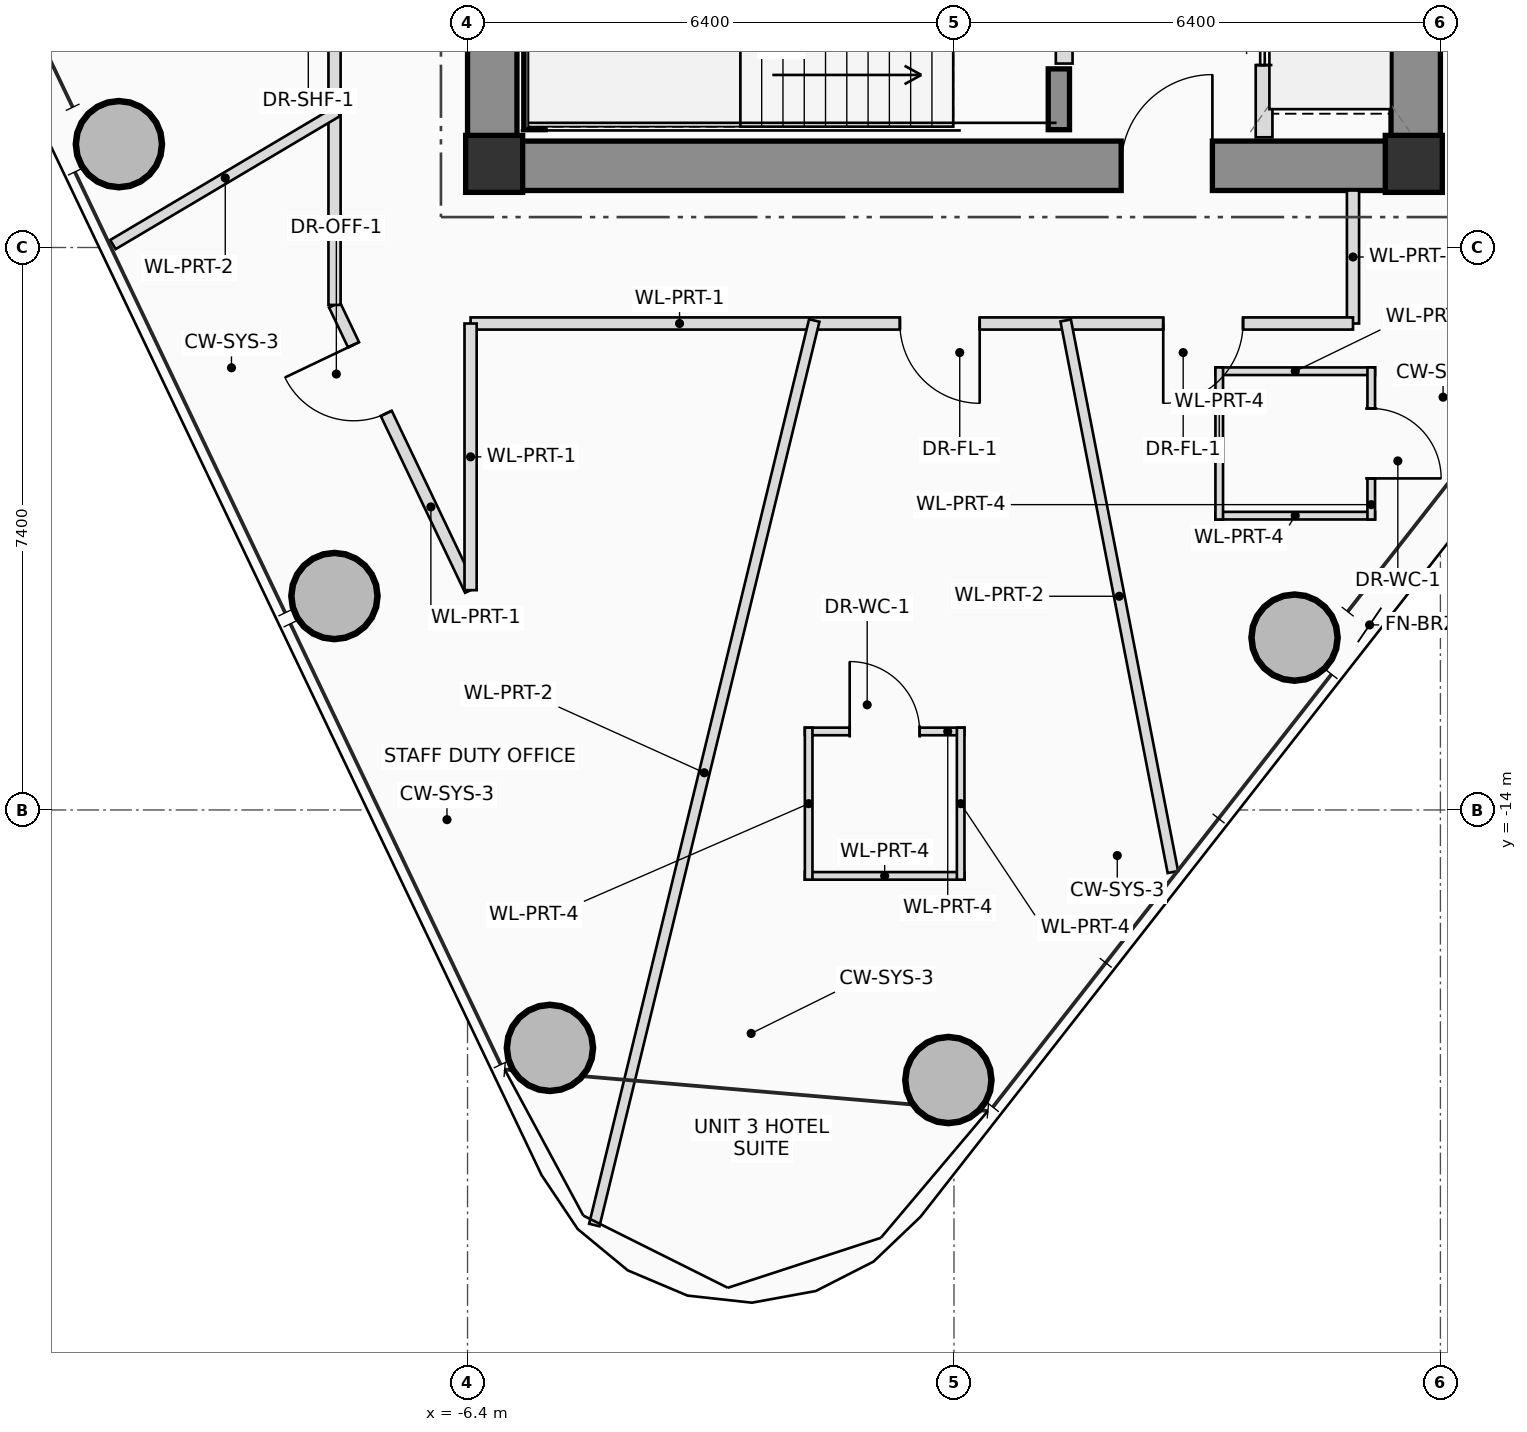
"""IFC4 building model, lengths in metres.
Left out: names, types, materials, properties, quantities, classifications, styles, units other than length and angle.
Written with IfcOpenShell. Run it as: python <this file> out.ifc"""

import sys

from ifc_helpers import new_model, si_unit, direction, frame, frame_2d, origin, origin_2d, place, context, subcontext, project, spatial, rectangle, hollow_circle, extrude, source, transform, mapped, element, fill, save


model = new_model("IFC4")
c1 = context("Model", 3, precision=1e-05, world=origin(), true_north=direction((0.0, 1.0)))
c2 = subcontext(c1, "Body", "Model", "MODEL_VIEW")
j1 = project(units=[si_unit("LENGTHUNIT", "METRE"), si_unit("PLANEANGLEUNIT", "RADIAN")], contexts=[c1])
p1 = place(None, origin())
s1 = spatial("IfcSite", under=j1, at=p1, CompositionType="ELEMENT")
p2 = place(p1, origin())
s2 = spatial("IfcBuilding", under=s1, at=p2, CompositionType="ELEMENT")
p3 = place(p2, frame((0.0, 0.0, 215.6)))
s3 = spatial("IfcBuildingStorey", under=s2, at=p3, CompositionType="ELEMENT", Elevation=215.6)
m1 = source(origin(), c2, "Body", "SweptSolid", [
    extrude(rectangle(XDim=0.75, YDim=0.75, at=origin_2d()), origin(), (0.0, 0.0, 1.0), 3.45),
])
for number, where, z_axis, x_axis in (
    (1, (-6.05, -5.5, 0.0), (0.0, 0.0, 1.0), (1.0, 0.0, 0.0)),
    (2, (6.05, -5.5, 0.0), (0.0, 0.0, 1.0), (1.0, 0.0, 0.0)),
):
    element("IfcColumn", number, at=place(p3, frame(where, z_axis=z_axis, x_axis=x_axis)), inside=s3, PredefinedType="COLUMN", context=c2, shape_type="MappedRepresentation", body=[
        mapped(m1, transform((0.0, 0.0, 0.0), scale=1.0)),
    ])
p4 = place(p3, frame((-6.4, -5.525, 0.0), z_axis=(0.0, 0.0, 1.0), x_axis=(1.0, 0.0, 0.0)))
e3 = element("IfcWall", 3, at=p4, inside=s3, PredefinedType="SHEAR", context=c2, shape_type="SweptSolid", body=[
    extrude(rectangle(XDim=12.8, YDim=0.65, at=frame_2d((6.4, 0.0))), origin(), (0.0, 0.0, 1.0), 3.45),
])
p5 = place(p4, frame((8.6, 0.0, 0.0)))
e4 = element("IfcOpeningElement", 4, at=p5, cuts=e3, PredefinedType="OPENING", context=c2, shape_type="SweptSolid", body=[
    extrude(rectangle(XDim=1.2, YDim=2.2, at=frame_2d((0.6, 1.1))), frame((0.0, 0.335, 0.0), z_axis=(0.0, -1.0, 0.0), x_axis=(1.0, 0.0, 0.0)), (0.0, 0.0, 1.0), 0.67),
])
p6 = place(p3, frame((6.075, -5.2, 0.0), z_axis=(0.0, 0.0, 1.0), x_axis=(0.0, 1.0, 0.0)))
e5 = element("IfcWall", 5, at=p6, inside=s3, PredefinedType="SHEAR", context=c2, shape_type="SweptSolid", body=[
    extrude(rectangle(XDim=10.4, YDim=0.65, at=frame_2d((5.2, 0.0))), origin(), (0.0, 0.0, 1.0), 3.45),
])
p7 = place(p3, frame((-6.075, -5.2, 0.0), z_axis=(0.0, 0.0, 1.0), x_axis=(0.0, 1.0, 0.0)))
e6 = element("IfcWall", 6, at=p7, inside=s3, PredefinedType="SHEAR", context=c2, shape_type="SweptSolid", body=[
    extrude(rectangle(XDim=3.45, YDim=0.65, at=frame_2d((1.725, 0.0))), origin(), (0.0, 0.0, 1.0), 3.45),
])
p8 = place(p3, frame((-5.52, -5.05, 0.0), z_axis=(0.0, 0.0, 1.0), x_axis=(0.0, 1.0, 0.0)))
e7 = element("IfcWall", 7, at=p8, inside=s3, PredefinedType="SHEAR", context=c2, shape_type="SweptSolid", body=[
    extrude(rectangle(XDim=2.75, YDim=0.28, at=frame_2d((1.375, 0.0))), origin(), (0.0, 0.0, 1.0), 3.45),
])
p9 = place(p3, frame((1.38, -5.05, 0.0), z_axis=(0.0, 0.0, 1.0), x_axis=(0.0, 1.0, 0.0)))
e8 = element("IfcWall", 8, at=p9, inside=s3, PredefinedType="SHEAR", context=c2, shape_type="SweptSolid", body=[
    extrude(rectangle(XDim=0.8, YDim=0.28, at=frame_2d((0.4, 0.0))), origin(), (0.0, 0.0, 1.0), 3.45),
])
m2 = source(origin(), c2, "Body", "SweptSolid", [
    extrude(hollow_circle(Radius=0.575, WallThickness=0.042, at=origin_2d()), origin(), (0.0, 0.0, 1.0), 3.45),
])
for number, where, z_axis, x_axis in (
    (9, (-0.073, -17.553, 0.0), (0.0, 0.0, 1.0), (1.0, 0.0, 0.0)),
    (10, (4.481, -11.732, 0.0), (0.0, 0.0, 1.0), (1.0, 0.0, 0.0)),
    (11, (-10.987, -5.24, 0.0), (0.0, 0.0, 1.0), (1.0, 0.0, 0.0)),
    (12, (-8.151, -11.185, 0.0), (0.0, 0.0, 1.0), (1.0, 0.0, 0.0)),
    (13, (-5.316, -17.13, 0.0), (0.0, 0.0, 1.0), (1.0, 0.0, 0.0)),
):
    element("IfcColumn", number, at=place(p3, frame(where, z_axis=z_axis, x_axis=x_axis)), inside=s3, PredefinedType="COLUMN", context=c2, shape_type="MappedRepresentation", body=[
        mapped(m2, transform((0.0, 0.0, 0.0), scale=1.0)),
    ])
p10 = place(p3, frame((1.45, -4.18, 0.0), z_axis=(0.0, 0.0, 1.0), x_axis=(0.0, 1.0, 0.0)))
e14 = element("IfcWall", 14, at=p10, inside=s3, PredefinedType="PLUMBINGWALL", context=c2, shape_type="SweptSolid", body=[
    extrude(rectangle(XDim=1.98, YDim=0.22, at=frame_2d((0.99, 0.0))), origin(), (0.0, 0.0, 1.0), 3.21),
])
p11 = place(p10, frame((0.42, 0.0, 0.0)))
e15 = element("IfcOpeningElement", 15, at=p11, cuts=e14, PredefinedType="OPENING", context=c2, shape_type="SweptSolid", body=[
    extrude(rectangle(XDim=1.15, YDim=2.15, at=frame_2d((0.575, 1.075))), frame((0.0, 0.12, 0.0), z_axis=(0.0, -1.0, 0.0), x_axis=(1.0, 0.0, 0.0)), (0.0, 0.0, 1.0), 0.24),
])
p12 = place(p3, frame((4.08, -5.15, 0.0), z_axis=(0.0, 0.0, 1.0), x_axis=(0.0, 1.0, 0.0)))
e16 = element("IfcWall", 16, at=p12, inside=s3, PredefinedType="PLUMBINGWALL", context=c2, shape_type="SweptSolid", body=[
    extrude(rectangle(XDim=2.95, YDim=0.22, at=frame_2d((1.475, 0.0))), origin(), (0.0, 0.0, 1.0), 3.21),
])
p13 = place(p12, frame((0.95, 0.0, 0.0)))
e17 = element("IfcOpeningElement", 17, at=p13, cuts=e16, PredefinedType="OPENING", context=c2, shape_type="SweptSolid", body=[
    extrude(rectangle(XDim=1.2, YDim=2.25, at=frame_2d((0.6, 1.125))), frame((0.0, 0.12, 0.0), z_axis=(0.0, -1.0, 0.0), x_axis=(1.0, 0.0, 0.0)), (0.0, 0.0, 1.0), 0.24),
])
p14 = place(p3, frame((-1.962, -12.967, 0.0), z_axis=(0.0, 0.0, 1.0), x_axis=(1.0, 0.0, 0.0)))
e18 = element("IfcWall", 18, at=p14, inside=s3, PredefinedType="PARTITIONING", context=c2, shape_type="SweptSolid", body=[
    extrude(rectangle(XDim=2.1, YDim=0.1, at=frame_2d((1.05, 0.0))), origin(), (0.0, 0.0, 1.0), 3.21),
])
p15 = place(p14, frame((0.59, 0.0, 0.0)))
e19 = element("IfcOpeningElement", 19, at=p15, cuts=e18, PredefinedType="OPENING", context=c2, shape_type="SweptSolid", body=[
    extrude(rectangle(XDim=0.92, YDim=2.1, at=frame_2d((0.46, 1.05))), frame((0.0, 0.06, 0.0), z_axis=(0.0, -1.0, 0.0), x_axis=(1.0, 0.0, 0.0)), (0.0, 0.0, 1.0), 0.12),
])
p16 = place(p3, frame((0.138, -14.867, 0.0), z_axis=(0.0, 0.0, 1.0), x_axis=(-1.0, 0.0, 0.0)))
e20 = element("IfcWall", 20, at=p16, inside=s3, PredefinedType="PARTITIONING", context=c2, shape_type="SweptSolid", body=[
    extrude(rectangle(XDim=2.1, YDim=0.1, at=frame_2d((1.05, 0.0))), origin(), (0.0, 0.0, 1.0), 2.565),
])
p17 = place(p3, frame((0.088, -12.917, 0.0), z_axis=(0.0, 0.0, 1.0), x_axis=(0.0, -1.0, 0.0)))
e21 = element("IfcWall", 21, at=p17, inside=s3, PredefinedType="PARTITIONING", context=c2, shape_type="SweptSolid", body=[
    extrude(rectangle(XDim=2.0, YDim=0.1, at=frame_2d((1.0, 0.0))), origin(), (0.0, 0.0, 1.0), 2.865),
])
p18 = place(p3, frame((-1.912, -14.917, 0.0), z_axis=(0.0, 0.0, 1.0), x_axis=(0.0, 1.0, 0.0)))
e22 = element("IfcWall", 22, at=p18, inside=s3, PredefinedType="PARTITIONING", context=c2, shape_type="SweptSolid", body=[
    extrude(rectangle(XDim=2.0, YDim=0.1, at=frame_2d((1.0, 0.0))), origin(), (0.0, 0.0, 1.0), 2.565),
])
for number, where, z_axis, x_axis in (
    (23, (3.44, -8.228, 0.0), (0.0, 0.0, 1.0), (1.0, 0.0, 0.0)),
    (24, (5.54, -10.128, 0.0), (0.0, 0.0, 1.0), (-1.0, 0.0, 0.0)),
):
    element("IfcWall", number, at=place(p3, frame(where, z_axis=z_axis, x_axis=x_axis)), inside=s3, PredefinedType="PARTITIONING", context=c2, shape_type="SweptSolid", body=[
        extrude(rectangle(XDim=2.1, YDim=0.1, at=frame_2d((1.05, 0.0))), origin(), (0.0, 0.0, 1.0), 2.565),
    ])
p19 = place(p3, frame((5.49, -8.178, 0.0), z_axis=(0.0, 0.0, 1.0), x_axis=(0.0, -1.0, 0.0)))
e25 = element("IfcWall", 25, at=p19, inside=s3, PredefinedType="PARTITIONING", context=c2, shape_type="SweptSolid", body=[
    extrude(rectangle(XDim=2.0, YDim=0.1, at=frame_2d((1.0, 0.0))), origin(), (0.0, 0.0, 1.0), 2.565),
])
p20 = place(p19, frame((0.54, 0.0, 0.0)))
e26 = element("IfcOpeningElement", 26, at=p20, cuts=e25, PredefinedType="OPENING", context=c2, shape_type="SweptSolid", body=[
    extrude(rectangle(XDim=0.92, YDim=2.1, at=frame_2d((0.46, 1.05))), frame((0.0, 0.06, 0.0), z_axis=(0.0, -1.0, 0.0), x_axis=(1.0, 0.0, 0.0)), (0.0, 0.0, 1.0), 0.12),
])
p21 = place(p3, frame((3.49, -10.178, 0.0), z_axis=(0.0, 0.0, 1.0), x_axis=(0.0, 1.0, 0.0)))
e27 = element("IfcWall", 27, at=p21, inside=s3, PredefinedType="PARTITIONING", context=c2, shape_type="SweptSolid", body=[
    extrude(rectangle(XDim=2.0, YDim=0.1, at=frame_2d((1.0, 0.0))), origin(), (0.0, 0.0, 1.0), 2.765),
])
p22 = place(p3, frame((-6.36, -11.108, 0.0), z_axis=(0.0, 0.0, 1.0), x_axis=(-0.430460013629, 0.902609648002, 0.0)))
e28 = element("IfcWall", 28, at=p22, inside=s3, PredefinedType="PARTITIONING", context=c2, shape_type="SweptSolid", body=[
    extrude(rectangle(XDim=4.158, YDim=0.16, at=frame_2d((2.079, 0.0))), origin(), (0.0, 0.0, 1.0), 2.565),
])
p23 = place(p22, frame((2.577, 0.0, 0.0)))
e29 = element("IfcOpeningElement", 29, at=p23, cuts=e28, PredefinedType="OPENING", context=c2, shape_type="SweptSolid", body=[
    extrude(rectangle(XDim=1.0, YDim=2.25, at=frame_2d((0.5, 1.125))), frame((0.0, 0.09, 0.0), z_axis=(0.0, -1.0, 0.0), x_axis=(1.0, 0.0, 0.0)), (0.0, 0.0, 1.0), 0.18),
])
p24 = place(p3, frame((-8.15, -7.355, 0.0), z_axis=(0.0, 0.0, 1.0), x_axis=(0.0, 1.0, 0.0)))
e30 = element("IfcWall", 30, at=p24, inside=s3, PredefinedType="PARTITIONING", context=c2, shape_type="SweptSolid", body=[
    extrude(rectangle(XDim=14.956, YDim=0.16, at=frame_2d((7.478, 0.0))), origin(), (0.0, 0.0, 1.0), 2.565),
])
p25 = place(p24, frame((4.034, 0.0, 0.0)))
e31 = element("IfcOpeningElement", 31, at=p25, cuts=e30, PredefinedType="OPENING", context=c2, shape_type="SweptSolid", body=[
    extrude(rectangle(XDim=0.9, YDim=2.05, at=frame_2d((0.45, 1.025))), frame((0.0, 0.09, 0.0), z_axis=(0.0, -1.0, 0.0), x_axis=(1.0, 0.0, 0.0)), (0.0, 0.0, 1.0), 0.18),
])
p26 = place(p24, frame((10.129, 0.0, 0.0)))
e32 = element("IfcOpeningElement", 32, at=p26, cuts=e30, PredefinedType="OPENING", context=c2, shape_type="SweptSolid", body=[
    extrude(rectangle(XDim=1.0, YDim=2.25, at=frame_2d((0.5, 1.125))), frame((0.0, 0.09, 0.0), z_axis=(0.0, -1.0, 0.0), x_axis=(1.0, 0.0, 0.0)), (0.0, 0.0, 1.0), 0.18),
])
p27 = place(p3, frame((5.25, -5.85, 0.0), z_axis=(0.0, 0.0, 1.0), x_axis=(0.0, -1.0, 0.0)))
e33 = element("IfcWall", 33, at=p27, inside=s3, PredefinedType="PARTITIONING", context=c2, shape_type="SweptSolid", body=[
    extrude(rectangle(XDim=1.75, YDim=0.16, at=frame_2d((0.875, 0.0))), origin(), (0.0, 0.0, 1.0), 3.21),
])
p28 = place(p3, frame((5.25, -7.6, 0.0), z_axis=(0.0, 0.0, 1.0), x_axis=(-1.0, 0.0, 0.0)))
e34 = element("IfcWall", 34, at=p28, inside=s3, PredefinedType="PARTITIONING", context=c2, shape_type="SweptSolid", body=[
    extrude(rectangle(XDim=11.61, YDim=0.16, at=frame_2d((5.805, 0.0))), origin(), (0.0, 0.0, 1.0), 2.565),
])
p29 = place(p28, frame((1.447, 0.0, 0.0)))
e35 = element("IfcOpeningElement", 35, at=p29, cuts=e34, PredefinedType="OPENING", context=c2, shape_type="SweptSolid", body=[
    extrude(rectangle(XDim=1.05, YDim=2.2, at=frame_2d((0.525, 1.1))), frame((0.0, 0.09, 0.0), z_axis=(0.0, -1.0, 0.0), x_axis=(1.0, 0.0, 0.0)), (0.0, 0.0, 1.0), 0.18),
])
p30 = place(p28, frame((4.912, 0.0, 0.0)))
e36 = element("IfcOpeningElement", 36, at=p30, cuts=e34, PredefinedType="OPENING", context=c2, shape_type="SweptSolid", body=[
    extrude(rectangle(XDim=1.05, YDim=2.2, at=frame_2d((0.525, 1.1))), frame((0.0, 0.09, 0.0), z_axis=(0.0, -1.0, 0.0), x_axis=(1.0, 0.0, 0.0)), (0.0, 0.0, 1.0), 0.18),
])
p31 = place(p3, frame((-6.36, -7.6, 0.0), z_axis=(0.0, 0.0, 1.0), x_axis=(0.0, -1.0, 0.0)))
e37 = element("IfcWall", 37, at=p31, inside=s3, PredefinedType="PARTITIONING", context=c2, shape_type="SweptSolid", body=[
    extrude(rectangle(XDim=3.508, YDim=0.16, at=frame_2d((1.754, 0.0))), origin(), (0.0, 0.0, 1.0), 3.21),
])
p32 = place(p3, frame((-8.11, -4.809, 0.0), z_axis=(0.0, 0.0, 1.0), x_axis=(-0.860151862046, -0.510038012524, 0.0)))
e38 = element("IfcWall", 38, at=p32, inside=s3, PredefinedType="PARTITIONING", context=c2, shape_type="SweptSolid", body=[
    extrude(rectangle(XDim=3.436, YDim=0.14, at=frame_2d((1.718, 0.0))), origin(), (0.0, 0.0, 1.0), 2.565),
])
p33 = place(p3, frame((-1.838, -7.56, 0.0), z_axis=(0.0, 0.0, 1.0), x_axis=(-0.236259509823, -0.971689993783, 0.0)))
e39 = element("IfcWall", 39, at=p33, inside=s3, PredefinedType="PARTITIONING", context=c2, shape_type="SweptSolid", body=[
    extrude(rectangle(XDim=12.247, YDim=0.14, at=frame_2d((6.124, 0.0))), origin(), (0.0, 0.0, 1.0), 2.565),
])
p34 = place(p3, frame((1.469, -7.56, 0.0), z_axis=(0.0, 0.0, 1.0), x_axis=(0.190822808967, -0.981624498257, 0.0)))
e40 = element("IfcWall", 40, at=p34, inside=s3, PredefinedType="PARTITIONING", context=c2, shape_type="SweptSolid", body=[
    extrude(rectangle(XDim=7.392, YDim=0.14, at=frame_2d((3.696, 0.0))), origin(), (0.0, 0.0, 1.0), 2.725),
])
p35 = place(p5, origin())
e41 = element("IfcDoor", 41, at=p35, inside=s3, OperationType="SINGLE_SWING_RIGHT", PredefinedType="DOOR", context=c2, shape_type="SweptSolid", body=[
    extrude(rectangle(XDim=1.2, YDim=2.2, at=frame_2d((0.6, 1.1))), frame((0.0, 0.025, 0.0), z_axis=(0.0, -1.0, 0.0), x_axis=(1.0, 0.0, 0.0)), (0.0, 0.0, 1.0), 0.05),
])
fill(e4, e41)
p36 = place(p13, origin())
e42 = element("IfcDoor", 42, at=p36, inside=s3, OperationType="DOUBLE_DOOR_SLIDING", PredefinedType="DOOR", context=c2, shape_type="SweptSolid", body=[
    extrude(rectangle(XDim=1.2, YDim=2.25, at=frame_2d((0.6, 1.125))), frame((0.0, 0.025, 0.0), z_axis=(0.0, -1.0, 0.0), x_axis=(1.0, 0.0, 0.0)), (0.0, 0.0, 1.0), 0.05),
])
fill(e17, e42)
p37 = place(p15, origin())
e43 = element("IfcDoor", 43, at=p37, inside=s3, OperationType="SINGLE_SWING_LEFT", PredefinedType="DOOR", context=c2, shape_type="SweptSolid", body=[
    extrude(rectangle(XDim=0.92, YDim=2.1, at=frame_2d((0.46, 1.05))), frame((0.0, 0.025, 0.0), z_axis=(0.0, -1.0, 0.0), x_axis=(1.0, 0.0, 0.0)), (0.0, 0.0, 1.0), 0.05),
])
fill(e19, e43)
p38 = place(p20, origin())
e44 = element("IfcDoor", 44, at=p38, inside=s3, OperationType="SINGLE_SWING_RIGHT", PredefinedType="DOOR", context=c2, shape_type="SweptSolid", body=[
    extrude(rectangle(XDim=0.92, YDim=2.1, at=frame_2d((0.46, 1.05))), frame((0.0, 0.025, 0.0), z_axis=(0.0, -1.0, 0.0), x_axis=(1.0, 0.0, 0.0)), (0.0, 0.0, 1.0), 0.05),
])
fill(e26, e44)
p39 = place(p23, origin())
e45 = element("IfcDoor", 45, at=p39, inside=s3, OperationType="SINGLE_SWING_RIGHT", PredefinedType="DOOR", context=c2, shape_type="SweptSolid", body=[
    extrude(rectangle(XDim=1.0, YDim=2.25, at=frame_2d((0.5, 1.125))), frame((0.0, 0.025, 0.0), z_axis=(0.0, -1.0, 0.0), x_axis=(1.0, 0.0, 0.0)), (0.0, 0.0, 1.0), 0.05),
])
fill(e29, e45)
p40 = place(p29, origin())
e46 = element("IfcDoor", 46, at=p40, inside=s3, OperationType="SINGLE_SWING_RIGHT", PredefinedType="DOOR", context=c2, shape_type="SweptSolid", body=[
    extrude(rectangle(XDim=1.05, YDim=2.2, at=frame_2d((0.525, 1.1))), frame((0.0, 0.025, 0.0), z_axis=(0.0, -1.0, 0.0), x_axis=(1.0, 0.0, 0.0)), (0.0, 0.0, 1.0), 0.05),
])
fill(e35, e46)
p41 = place(p30, origin())
e47 = element("IfcDoor", 47, at=p41, inside=s3, OperationType="SINGLE_SWING_LEFT", PredefinedType="DOOR", context=c2, shape_type="SweptSolid", body=[
    extrude(rectangle(XDim=1.05, YDim=2.2, at=frame_2d((0.525, 1.1))), frame((0.0, 0.025, 0.0), z_axis=(0.0, -1.0, 0.0), x_axis=(1.0, 0.0, 0.0)), (0.0, 0.0, 1.0), 0.05),
])
fill(e36, e47)
save(model, sys.argv[1])
